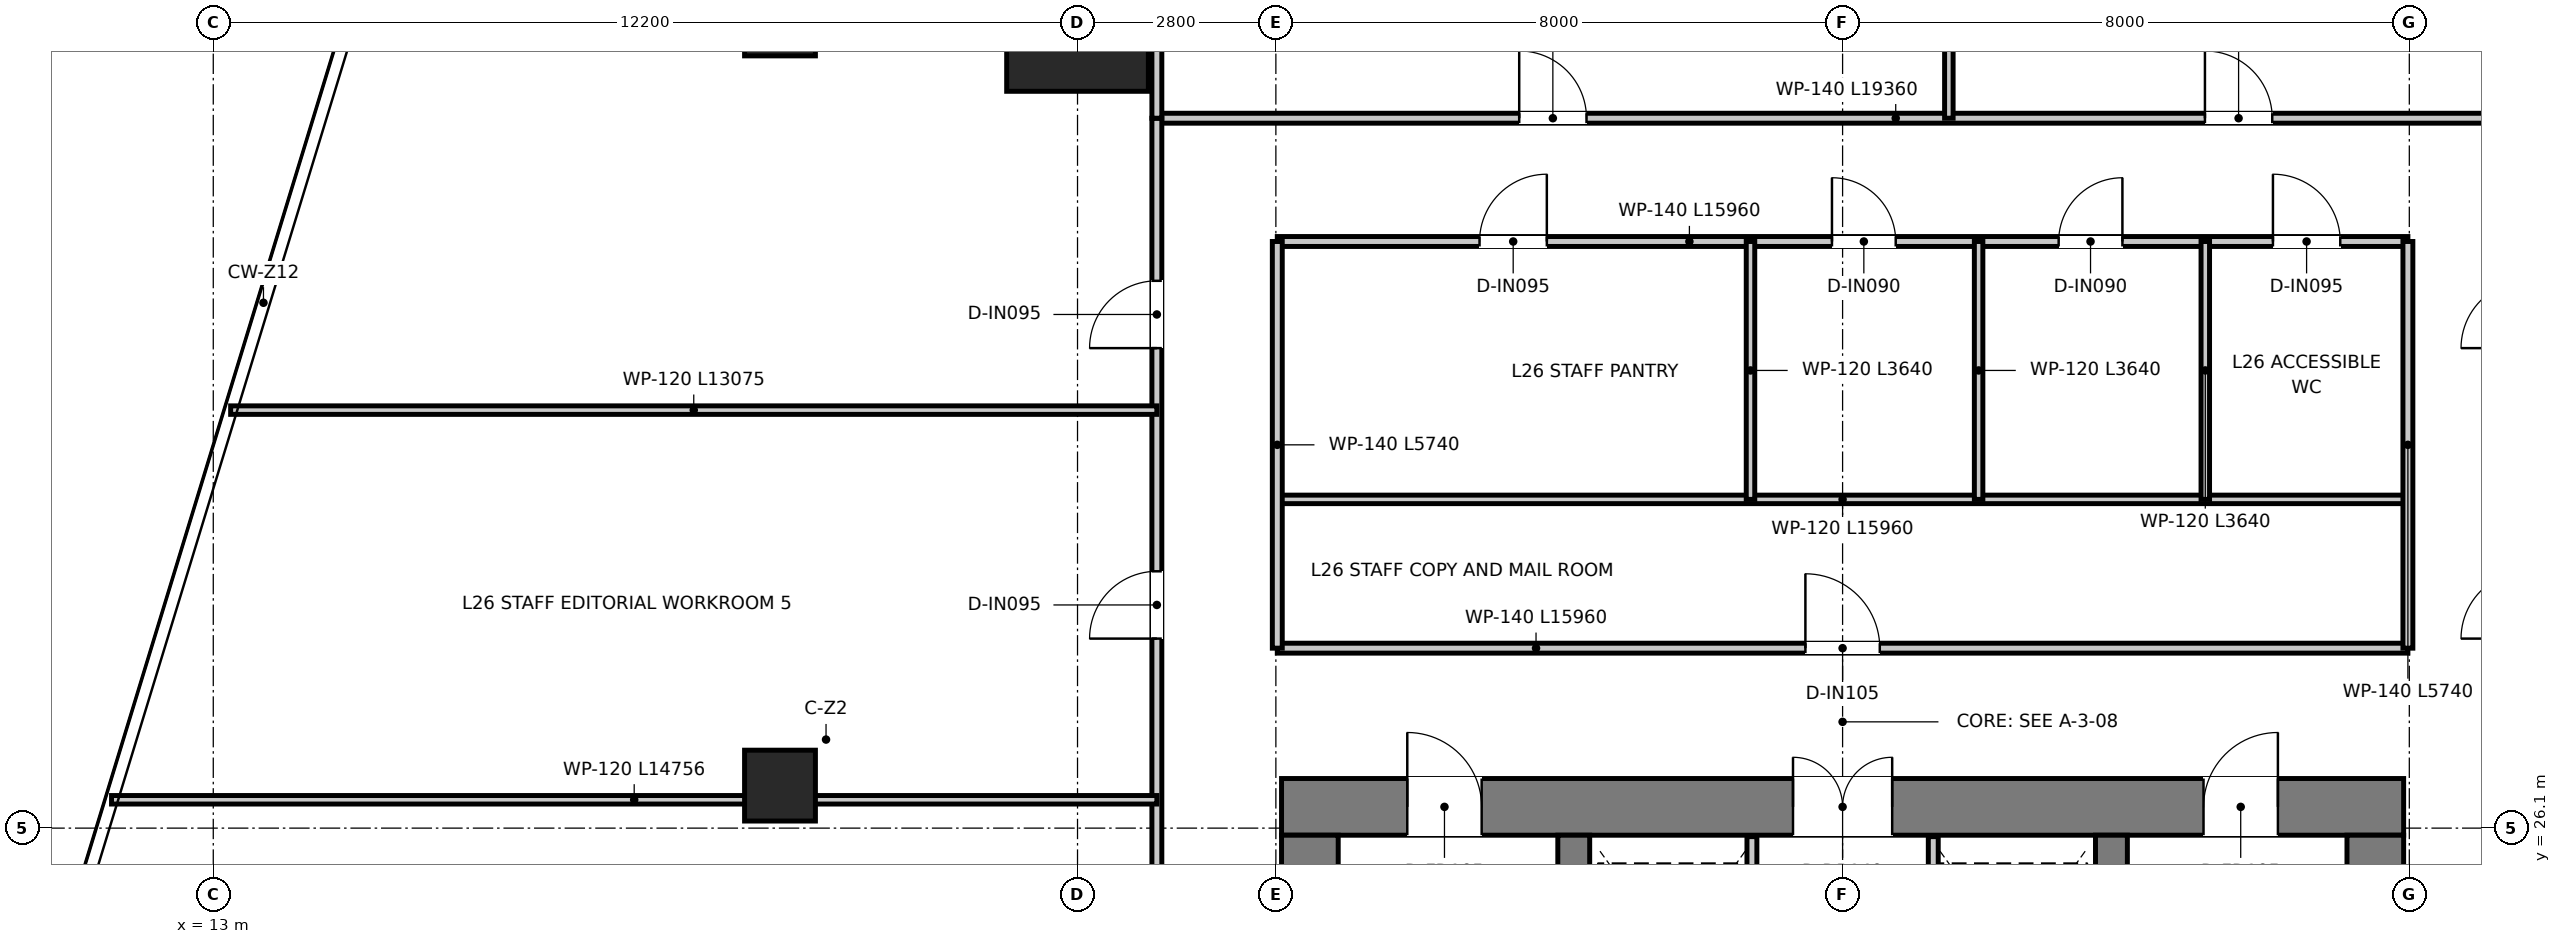
"""IFC4 building model, lengths in metres.
Left out: names, types, materials, properties, quantities, classifications, styles, units other than length and angle.
Written with IfcOpenShell. Run it as: python <this file> out.ifc"""

import sys

from ifc_helpers import new_model, si_unit, direction, frame, frame_2d, origin, origin_2d, place, context, subcontext, project, spatial, rectangle, extrude, source, transform, mapped, element, fill, save


model = new_model("IFC4")
c1 = context("Model", 3, precision=1e-05, world=origin(), true_north=direction((0.0, 1.0)))
c2 = subcontext(c1, "Body", "Model", "MODEL_VIEW")
j1 = project(units=[si_unit("LENGTHUNIT", "METRE"), si_unit("PLANEANGLEUNIT", "RADIAN")], contexts=[c1])
p1 = place(None, origin())
s1 = spatial("IfcSite", under=j1, at=p1, CompositionType="ELEMENT")
p2 = place(p1, origin())
s2 = spatial("IfcBuilding", under=s1, at=p2, CompositionType="ELEMENT")
p3 = place(p2, frame((0.0, 0.0, 109.8)))
s3 = spatial("IfcBuildingStorey", under=s2, at=p3, CompositionType="ELEMENT", Elevation=109.8)
p4 = place(p3, frame((28.08, 26.4, 0.0), z_axis=(0.0, 0.0, 1.0), x_axis=(1.0, 0.0, 0.0)))
e1 = element("IfcWall", 1, at=p4, inside=s3, PredefinedType="SHEAR", context=c2, shape_type="SweptSolid", body=[
    extrude(rectangle(XDim=15.84, YDim=0.8, at=frame_2d((7.92, 0.0))), origin(), (0.0, 0.0, 1.0), 3.95),
])
p5 = place(p4, frame((7.22, 0.0, 0.0)))
e2 = element("IfcOpeningElement", 2, at=p5, cuts=e1, PredefinedType="OPENING", context=c2, shape_type="SweptSolid", body=[
    extrude(rectangle(XDim=1.4, YDim=2.2, at=frame_2d((0.7, 1.1))), frame((0.0, 0.41, 0.0), z_axis=(0.0, -1.0, 0.0), x_axis=(1.0, 0.0, 0.0)), (0.0, 0.0, 1.0), 0.82),
])
p6 = place(p4, frame((1.775, 0.0, 0.0)))
e3 = element("IfcOpeningElement", 3, at=p6, cuts=e1, PredefinedType="OPENING", context=c2, shape_type="SweptSolid", body=[
    extrude(rectangle(XDim=1.05, YDim=2.1, at=frame_2d((0.525, 1.05))), frame((0.0, 0.41, 0.0), z_axis=(0.0, -1.0, 0.0), x_axis=(1.0, 0.0, 0.0)), (0.0, 0.0, 1.0), 0.82),
])
p7 = place(p4, frame((13.015, 0.0, 0.0)))
e4 = element("IfcOpeningElement", 4, at=p7, cuts=e1, PredefinedType="OPENING", context=c2, shape_type="SweptSolid", body=[
    extrude(rectangle(XDim=1.05, YDim=2.1, at=frame_2d((0.525, 1.05))), frame((0.0, 0.41, 0.0), z_axis=(0.0, -1.0, 0.0), x_axis=(1.0, 0.0, 0.0)), (0.0, 0.0, 1.0), 0.82),
])
for number, where, z_axis, x_axis in (
    (5, (28.48, 11.3, 0.0), (0.0, 0.0, 1.0), (0.0, 1.0, 0.0)),
    (6, (43.52, 11.3, 0.0), (0.0, 0.0, 1.0), (0.0, 1.0, 0.0)),
):
    element("IfcWall", number, at=place(p3, frame(where, z_axis=z_axis, x_axis=x_axis)), inside=s3, PredefinedType="SHEAR", context=c2, shape_type="SweptSolid", body=[
        extrude(rectangle(XDim=14.7, YDim=0.8, at=frame_2d((7.35, 0.0))), origin(), (0.0, 0.0, 1.0), 3.95),
    ])
p8 = place(p3, frame((32.205, 13.22, 0.0), z_axis=(0.0, 0.0, 1.0), x_axis=(0.0, 1.0, 0.0)))
e7 = element("IfcWall", 7, at=p8, inside=s3, PredefinedType="SHEAR", context=c2, shape_type="SweptSolid", body=[
    extrude(rectangle(XDim=12.78, YDim=0.45, at=frame_2d((6.39, 0.0))), origin(), (0.0, 0.0, 1.0), 3.95),
])
p9 = place(p8, frame((10.58, 0.0, 0.0)))
e8 = element("IfcOpeningElement", 8, at=p9, cuts=e7, PredefinedType="OPENING", context=c2, shape_type="SweptSolid", body=[
    extrude(rectangle(XDim=1.1, YDim=2.15, at=frame_2d((0.55, 1.075))), frame((0.0, 0.235, 0.0), z_axis=(0.0, -1.0, 0.0), x_axis=(1.0, 0.0, 0.0)), (0.0, 0.0, 1.0), 0.47),
])
p10 = place(p3, frame((39.795, 13.22, 0.0), z_axis=(0.0, 0.0, 1.0), x_axis=(0.0, 1.0, 0.0)))
e9 = element("IfcWall", 9, at=p10, inside=s3, PredefinedType="SHEAR", context=c2, shape_type="SweptSolid", body=[
    extrude(rectangle(XDim=12.78, YDim=0.45, at=frame_2d((6.39, 0.0))), origin(), (0.0, 0.0, 1.0), 3.95),
])
p11 = place(p10, frame((10.58, 0.0, 0.0)))
e10 = element("IfcOpeningElement", 10, at=p11, cuts=e9, PredefinedType="OPENING", context=c2, shape_type="SweptSolid", body=[
    extrude(rectangle(XDim=1.1, YDim=2.15, at=frame_2d((0.55, 1.075))), frame((0.0, 0.235, 0.0), z_axis=(0.0, -1.0, 0.0), x_axis=(1.0, 0.0, 0.0)), (0.0, 0.0, 1.0), 0.47),
])
m1 = source(origin(), c2, "Body", "SweptSolid", [
    extrude(rectangle(XDim=2.0, YDim=2.0, at=origin_2d()), origin(), (0.0, 0.0, 1.0), 3.95),
])
p12 = place(p3, frame((25.2, 37.5, 0.0), z_axis=(0.0, 0.0, 1.0), x_axis=(1.0, 0.0, 0.0)))
e11 = element("IfcColumn", 11, at=p12, inside=s3, PredefinedType="USERDEFINED", context=c2, shape_type="MappedRepresentation", body=[
    mapped(m1, transform((0.0, 0.0, 0.0), x_axis=(1.0, 0.0, 0.0), y_axis=(0.0, 1.0, 0.0), z_axis=(0.0, 0.0, 1.0), scale=1.0)),
])
m2 = source(origin(), c2, "Body", "SweptSolid", [
    extrude(rectangle(XDim=1.0, YDim=1.0, at=origin_2d()), origin(), (0.0, 0.0, 1.0), 3.95),
])
for number, where, z_axis, x_axis in (
    (12, (21.0, 26.7, 0.0), (0.0, 0.0, 1.0), (1.0, 0.0, 0.0)),
    (13, (21.0, 37.5, 0.0), (0.0, 0.0, 1.0), (1.0, 0.0, 0.0)),
):
    element("IfcColumn", number, at=place(p3, frame(where, z_axis=z_axis, x_axis=x_axis)), inside=s3, PredefinedType="COLUMN", context=c2, shape_type="MappedRepresentation", body=[
        mapped(m2, transform((0.0, 0.0, 0.0), x_axis=(1.0, 0.0, 0.0), y_axis=(0.0, 1.0, 0.0), z_axis=(0.0, 0.0, 1.0), scale=1.0)),
    ])
p13 = place(p3, frame((34.72, 20.2, 0.0), z_axis=(0.0, 0.0, 1.0), x_axis=(0.0, 1.0, 0.0)))
e14 = element("IfcWall", 14, at=p13, inside=s3, PredefinedType="PARTITIONING", context=c2, shape_type="SweptSolid", body=[
    extrude(rectangle(XDim=5.78, YDim=0.14, at=frame_2d((2.89, 0.0))), origin(), (0.0, 0.0, 1.0), 2.67),
])
p14 = place(p13, frame((1.05, 0.0, 0.0)))
e15 = element("IfcOpeningElement", 15, at=p14, cuts=e14, PredefinedType="OPENING", context=c2, shape_type="SweptSolid", body=[
    extrude(rectangle(XDim=0.9, YDim=2.1, at=frame_2d((0.45, 1.05))), frame((0.0, 0.08, 0.0), z_axis=(0.0, -1.0, 0.0), x_axis=(1.0, 0.0, 0.0)), (0.0, 0.0, 1.0), 0.16),
])
p15 = place(p3, frame((37.28, 20.2, 0.0), z_axis=(0.0, 0.0, 1.0), x_axis=(0.0, 1.0, 0.0)))
e16 = element("IfcWall", 16, at=p15, inside=s3, PredefinedType="PARTITIONING", context=c2, shape_type="SweptSolid", body=[
    extrude(rectangle(XDim=5.78, YDim=0.14, at=frame_2d((2.89, 0.0))), origin(), (0.0, 0.0, 1.0), 2.67),
])
p16 = place(p15, frame((0.95, 0.0, 0.0)))
e17 = element("IfcOpeningElement", 17, at=p16, cuts=e16, PredefinedType="OPENING", context=c2, shape_type="SweptSolid", body=[
    extrude(rectangle(XDim=1.1, YDim=2.15, at=frame_2d((0.55, 1.075))), frame((0.0, 0.08, 0.0), z_axis=(0.0, -1.0, 0.0), x_axis=(1.0, 0.0, 0.0)), (0.0, 0.0, 1.0), 0.16),
])
p17 = place(p3, frame((28.02, 28.64, 0.0), z_axis=(0.0, 0.0, 1.0), x_axis=(1.0, 0.0, 0.0)))
e18 = element("IfcWall", 18, at=p17, inside=s3, PredefinedType="PARTITIONING", context=c2, shape_type="SweptSolid", body=[
    extrude(rectangle(XDim=15.96, YDim=0.14, at=frame_2d((7.98, 0.0))), origin(), (0.0, 0.0, 1.0), 3.08),
])
p18 = place(p17, frame((7.455, 0.0, 0.0)))
e19 = element("IfcOpeningElement", 19, at=p18, cuts=e18, PredefinedType="OPENING", context=c2, shape_type="SweptSolid", body=[
    extrude(rectangle(XDim=1.05, YDim=2.15, at=frame_2d((0.525, 1.075))), frame((0.0, 0.08, 0.0), z_axis=(0.0, -1.0, 0.0), x_axis=(1.0, 0.0, 0.0)), (0.0, 0.0, 1.0), 0.16),
])
p19 = place(p3, frame((28.02, 30.74, 0.0), z_axis=(0.0, 0.0, 1.0), x_axis=(1.0, 0.0, 0.0)))
e20 = element("IfcWall", 20, at=p19, inside=s3, PredefinedType="PARTITIONING", context=c2, shape_type="SweptSolid", body=[
    extrude(rectangle(XDim=15.96, YDim=0.12, at=frame_2d((7.98, 0.0))), origin(), (0.0, 0.0, 1.0), 3.08),
])
p20 = place(p3, frame((28.02, 34.38, 0.0), z_axis=(0.0, 0.0, 1.0), x_axis=(1.0, 0.0, 0.0)))
e21 = element("IfcWall", 21, at=p20, inside=s3, PredefinedType="PARTITIONING", context=c2, shape_type="SweptSolid", body=[
    extrude(rectangle(XDim=15.96, YDim=0.14, at=frame_2d((7.98, 0.0))), origin(), (0.0, 0.0, 1.0), 3.08),
])
p21 = place(p20, frame((7.83, 0.0, 0.0)))
e22 = element("IfcOpeningElement", 22, at=p21, cuts=e21, PredefinedType="OPENING", context=c2, shape_type="SweptSolid", body=[
    extrude(rectangle(XDim=0.9, YDim=2.1, at=frame_2d((0.45, 1.05))), frame((0.0, 0.08, 0.0), z_axis=(0.0, -1.0, 0.0), x_axis=(1.0, 0.0, 0.0)), (0.0, 0.0, 1.0), 0.16),
])
p22 = place(p20, frame((11.03, 0.0, 0.0)))
e23 = element("IfcOpeningElement", 23, at=p22, cuts=e21, PredefinedType="OPENING", context=c2, shape_type="SweptSolid", body=[
    extrude(rectangle(XDim=0.9, YDim=2.1, at=frame_2d((0.45, 1.05))), frame((0.0, 0.08, 0.0), z_axis=(0.0, -1.0, 0.0), x_axis=(1.0, 0.0, 0.0)), (0.0, 0.0, 1.0), 0.16),
])
p23 = place(p20, frame((14.055, 0.0, 0.0)))
e24 = element("IfcOpeningElement", 24, at=p23, cuts=e21, PredefinedType="OPENING", context=c2, shape_type="SweptSolid", body=[
    extrude(rectangle(XDim=0.95, YDim=2.1, at=frame_2d((0.475, 1.05))), frame((0.0, 0.08, 0.0), z_axis=(0.0, -1.0, 0.0), x_axis=(1.0, 0.0, 0.0)), (0.0, 0.0, 1.0), 0.16),
])
p24 = place(p20, frame((2.855, 0.0, 0.0)))
e25 = element("IfcOpeningElement", 25, at=p24, cuts=e21, PredefinedType="OPENING", context=c2, shape_type="SweptSolid", body=[
    extrude(rectangle(XDim=0.95, YDim=2.1, at=frame_2d((0.475, 1.05))), frame((0.0, 0.08, 0.0), z_axis=(0.0, -1.0, 0.0), x_axis=(1.0, 0.0, 0.0)), (0.0, 0.0, 1.0), 0.16),
])
for number, where, z_axis, x_axis in (
    (26, (28.02, 28.64, 0.0), (0.0, 0.0, 1.0), (0.0, 1.0, 0.0)),
    (27, (43.98, 28.64, 0.0), (0.0, 0.0, 1.0), (0.0, 1.0, 0.0)),
):
    element("IfcWall", number, at=place(p3, frame(where, z_axis=z_axis, x_axis=x_axis)), inside=s3, PredefinedType="PARTITIONING", context=c2, shape_type="SweptSolid", body=[
        extrude(rectangle(XDim=5.74, YDim=0.14, at=frame_2d((2.87, 0.0))), origin(), (0.0, 0.0, 1.0), 3.27),
    ])
for number, where, z_axis, x_axis in (
    (28, (37.92, 30.74, 0.0), (0.0, 0.0, 1.0), (0.0, 1.0, 0.0)),
    (29, (41.12, 30.74, 0.0), (0.0, 0.0, 1.0), (0.0, 1.0, 0.0)),
    (30, (34.7, 30.74, 0.0), (0.0, 0.0, 1.0), (0.0, 1.0, 0.0)),
):
    element("IfcWall", number, at=place(p3, frame(where, z_axis=z_axis, x_axis=x_axis)), inside=s3, PredefinedType="PARTITIONING", context=c2, shape_type="SweptSolid", body=[
        extrude(rectangle(XDim=3.64, YDim=0.12, at=frame_2d((1.82, 0.0))), origin(), (0.0, 0.0, 1.0), 3.17),
    ])
p25 = place(p3, frame((26.32, 36.12, 0.0), z_axis=(0.0, 0.0, 1.0), x_axis=(1.0, 0.0, 0.0)))
e31 = element("IfcWall", 31, at=p25, inside=s3, PredefinedType="PARTITIONING", context=c2, shape_type="SweptSolid", body=[
    extrude(rectangle(XDim=19.36, YDim=0.14, at=frame_2d((9.68, 0.0))), origin(), (0.0, 0.0, 1.0), 3.08),
])
p26 = place(p25, frame((5.115, 0.0, 0.0)))
e32 = element("IfcOpeningElement", 32, at=p26, cuts=e31, PredefinedType="OPENING", context=c2, shape_type="SweptSolid", body=[
    extrude(rectangle(XDim=0.95, YDim=2.1, at=frame_2d((0.475, 1.05))), frame((0.0, 0.08, 0.0), z_axis=(0.0, -1.0, 0.0), x_axis=(1.0, 0.0, 0.0)), (0.0, 0.0, 1.0), 0.16),
])
p27 = place(p25, frame((14.795, 0.0, 0.0)))
e33 = element("IfcOpeningElement", 33, at=p27, cuts=e31, PredefinedType="OPENING", context=c2, shape_type="SweptSolid", body=[
    extrude(rectangle(XDim=0.95, YDim=2.1, at=frame_2d((0.475, 1.05))), frame((0.0, 0.08, 0.0), z_axis=(0.0, -1.0, 0.0), x_axis=(1.0, 0.0, 0.0)), (0.0, 0.0, 1.0), 0.16),
])
p28 = place(p3, frame((26.32, 10.5, 0.0), z_axis=(0.0, 0.0, 1.0), x_axis=(0.0, 1.0, 0.0)))
e34 = element("IfcWall", 34, at=p28, inside=s3, PredefinedType="PARTITIONING", context=c2, shape_type="SweptSolid", body=[
    extrude(rectangle(XDim=25.62, YDim=0.14, at=frame_2d((12.81, 0.0))), origin(), (0.0, 0.0, 1.0), 2.97),
])
p29 = place(p28, frame((8.275, 0.0, 0.0)))
e35 = element("IfcOpeningElement", 35, at=p29, cuts=e34, PredefinedType="OPENING", context=c2, shape_type="SweptSolid", body=[
    extrude(rectangle(XDim=0.95, YDim=2.1, at=frame_2d((0.475, 1.05))), frame((0.0, 0.08, 0.0), z_axis=(0.0, -1.0, 0.0), x_axis=(1.0, 0.0, 0.0)), (0.0, 0.0, 1.0), 0.16),
])
p30 = place(p28, frame((12.775, 0.0, 0.0)))
e36 = element("IfcOpeningElement", 36, at=p30, cuts=e34, PredefinedType="OPENING", context=c2, shape_type="SweptSolid", body=[
    extrude(rectangle(XDim=0.95, YDim=2.1, at=frame_2d((0.475, 1.05))), frame((0.0, 0.08, 0.0), z_axis=(0.0, -1.0, 0.0), x_axis=(1.0, 0.0, 0.0)), (0.0, 0.0, 1.0), 0.16),
])
p31 = place(p28, frame((18.275, 0.0, 0.0)))
e37 = element("IfcOpeningElement", 37, at=p31, cuts=e34, PredefinedType="OPENING", context=c2, shape_type="SweptSolid", body=[
    extrude(rectangle(XDim=0.95, YDim=2.1, at=frame_2d((0.475, 1.05))), frame((0.0, 0.08, 0.0), z_axis=(0.0, -1.0, 0.0), x_axis=(1.0, 0.0, 0.0)), (0.0, 0.0, 1.0), 0.16),
])
p32 = place(p28, frame((22.375, 0.0, 0.0)))
e38 = element("IfcOpeningElement", 38, at=p32, cuts=e34, PredefinedType="OPENING", context=c2, shape_type="SweptSolid", body=[
    extrude(rectangle(XDim=0.95, YDim=2.1, at=frame_2d((0.475, 1.05))), frame((0.0, 0.08, 0.0), z_axis=(0.0, -1.0, 0.0), x_axis=(1.0, 0.0, 0.0)), (0.0, 0.0, 1.0), 0.16),
])
p33 = place(p3, frame((26.32, 36.12, 0.0), z_axis=(0.0, 0.0, 1.0), x_axis=(0.0, 1.0, 0.0)))
e39 = element("IfcWall", 39, at=p33, inside=s3, PredefinedType="PARTITIONING", context=c2, shape_type="SweptSolid", body=[
    extrude(rectangle(XDim=17.914, YDim=0.14, at=frame_2d((8.957, 0.0))), origin(), (0.0, 0.0, 1.0), 2.97),
])
p34 = place(p3, frame((37.5, 36.12, 0.0), z_axis=(0.0, 0.0, 1.0), x_axis=(0.0, 1.0, 0.0)))
e40 = element("IfcWall", 40, at=p34, inside=s3, PredefinedType="PARTITIONING", context=c2, shape_type="SweptSolid", body=[
    extrude(rectangle(XDim=14.496, YDim=0.12, at=frame_2d((7.248, 0.0))), origin(), (0.0, 0.0, 1.0), 2.97),
])
p35 = place(p3, frame((11.564, 26.5, 0.0), z_axis=(0.0, 0.0, 1.0), x_axis=(1.0, 0.0, 0.0)))
e41 = element("IfcWall", 41, at=p35, inside=s3, PredefinedType="PARTITIONING", context=c2, shape_type="SweptSolid", body=[
    extrude(rectangle(XDim=14.756, YDim=0.12, at=frame_2d((7.378, 0.0))), origin(), (0.0, 0.0, 1.0), 2.97),
])
p36 = place(p3, frame((13.245, 32.0, 0.0), z_axis=(0.0, 0.0, 1.0), x_axis=(1.0, 0.0, 0.0)))
e42 = element("IfcWall", 42, at=p36, inside=s3, PredefinedType="PARTITIONING", context=c2, shape_type="SweptSolid", body=[
    extrude(rectangle(XDim=13.075, YDim=0.12, at=frame_2d((6.537, 0.0))), origin(), (0.0, 0.0, 1.0), 2.97),
])
p37 = place(p5, origin())
e43 = element("IfcDoor", 43, at=p37, inside=s3, OperationType="DOUBLE_DOOR_SINGLE_SWING", PredefinedType="DOOR", context=c2, shape_type="SweptSolid", body=[
    extrude(rectangle(XDim=1.4, YDim=2.2, at=frame_2d((0.7, 1.1))), frame((0.0, 0.025, 0.0), z_axis=(0.0, -1.0, 0.0), x_axis=(1.0, 0.0, 0.0)), (0.0, 0.0, 1.0), 0.05),
])
fill(e2, e43)
p38 = place(p6, origin())
e44 = element("IfcDoor", 44, at=p38, inside=s3, OperationType="SINGLE_SWING_LEFT", PredefinedType="DOOR", context=c2, shape_type="SweptSolid", body=[
    extrude(rectangle(XDim=1.05, YDim=2.1, at=frame_2d((0.525, 1.05))), frame((0.0, 0.025, 0.0), z_axis=(0.0, -1.0, 0.0), x_axis=(1.0, 0.0, 0.0)), (0.0, 0.0, 1.0), 0.05),
])
fill(e3, e44)
p39 = place(p7, origin())
e45 = element("IfcDoor", 45, at=p39, inside=s3, OperationType="SINGLE_SWING_RIGHT", PredefinedType="DOOR", context=c2, shape_type="SweptSolid", body=[
    extrude(rectangle(XDim=1.05, YDim=2.1, at=frame_2d((0.525, 1.05))), frame((0.0, 0.025, 0.0), z_axis=(0.0, -1.0, 0.0), x_axis=(1.0, 0.0, 0.0)), (0.0, 0.0, 1.0), 0.05),
])
fill(e4, e45)
p40 = place(p18, origin())
e46 = element("IfcDoor", 46, at=p40, inside=s3, OperationType="SINGLE_SWING_LEFT", PredefinedType="DOOR", context=c2, shape_type="SweptSolid", body=[
    extrude(rectangle(XDim=1.05, YDim=2.15, at=frame_2d((0.525, 1.075))), frame((0.0, 0.025, 0.0), z_axis=(0.0, -1.0, 0.0), x_axis=(1.0, 0.0, 0.0)), (0.0, 0.0, 1.0), 0.05),
])
fill(e19, e46)
p41 = place(p21, origin())
e47 = element("IfcDoor", 47, at=p41, inside=s3, OperationType="SINGLE_SWING_LEFT", PredefinedType="DOOR", context=c2, shape_type="SweptSolid", body=[
    extrude(rectangle(XDim=0.9, YDim=2.1, at=frame_2d((0.45, 1.05))), frame((0.0, 0.025, 0.0), z_axis=(0.0, -1.0, 0.0), x_axis=(1.0, 0.0, 0.0)), (0.0, 0.0, 1.0), 0.05),
])
fill(e22, e47)
p42 = place(p22, origin())
e48 = element("IfcDoor", 48, at=p42, inside=s3, OperationType="SINGLE_SWING_RIGHT", PredefinedType="DOOR", context=c2, shape_type="SweptSolid", body=[
    extrude(rectangle(XDim=0.9, YDim=2.1, at=frame_2d((0.45, 1.05))), frame((0.0, 0.025, 0.0), z_axis=(0.0, -1.0, 0.0), x_axis=(1.0, 0.0, 0.0)), (0.0, 0.0, 1.0), 0.05),
])
fill(e23, e48)
p43 = place(p23, origin())
e49 = element("IfcDoor", 49, at=p43, inside=s3, OperationType="SINGLE_SWING_LEFT", PredefinedType="DOOR", context=c2, shape_type="SweptSolid", body=[
    extrude(rectangle(XDim=0.95, YDim=2.1, at=frame_2d((0.475, 1.05))), frame((0.0, 0.025, 0.0), z_axis=(0.0, -1.0, 0.0), x_axis=(1.0, 0.0, 0.0)), (0.0, 0.0, 1.0), 0.05),
])
fill(e24, e49)
p44 = place(p24, origin())
e50 = element("IfcDoor", 50, at=p44, inside=s3, OperationType="SINGLE_SWING_RIGHT", PredefinedType="DOOR", context=c2, shape_type="SweptSolid", body=[
    extrude(rectangle(XDim=0.95, YDim=2.1, at=frame_2d((0.475, 1.05))), frame((0.0, 0.025, 0.0), z_axis=(0.0, -1.0, 0.0), x_axis=(1.0, 0.0, 0.0)), (0.0, 0.0, 1.0), 0.05),
])
fill(e25, e50)
p45 = place(p26, origin())
e51 = element("IfcDoor", 51, at=p45, inside=s3, OperationType="SINGLE_SWING_LEFT", PredefinedType="DOOR", context=c2, shape_type="SweptSolid", body=[
    extrude(rectangle(XDim=0.95, YDim=2.1, at=frame_2d((0.475, 1.05))), frame((0.0, 0.025, 0.0), z_axis=(0.0, -1.0, 0.0), x_axis=(1.0, 0.0, 0.0)), (0.0, 0.0, 1.0), 0.05),
])
fill(e32, e51)
p46 = place(p27, origin())
e52 = element("IfcDoor", 52, at=p46, inside=s3, OperationType="SINGLE_SWING_LEFT", PredefinedType="DOOR", context=c2, shape_type="SweptSolid", body=[
    extrude(rectangle(XDim=0.95, YDim=2.1, at=frame_2d((0.475, 1.05))), frame((0.0, 0.025, 0.0), z_axis=(0.0, -1.0, 0.0), x_axis=(1.0, 0.0, 0.0)), (0.0, 0.0, 1.0), 0.05),
])
fill(e33, e52)
p47 = place(p31, origin())
e53 = element("IfcDoor", 53, at=p47, inside=s3, OperationType="SINGLE_SWING_LEFT", PredefinedType="DOOR", context=c2, shape_type="SweptSolid", body=[
    extrude(rectangle(XDim=0.95, YDim=2.1, at=frame_2d((0.475, 1.05))), frame((0.0, 0.025, 0.0), z_axis=(0.0, -1.0, 0.0), x_axis=(1.0, 0.0, 0.0)), (0.0, 0.0, 1.0), 0.05),
])
fill(e37, e53)
p48 = place(p32, origin())
e54 = element("IfcDoor", 54, at=p48, inside=s3, OperationType="SINGLE_SWING_LEFT", PredefinedType="DOOR", context=c2, shape_type="SweptSolid", body=[
    extrude(rectangle(XDim=0.95, YDim=2.1, at=frame_2d((0.475, 1.05))), frame((0.0, 0.025, 0.0), z_axis=(0.0, -1.0, 0.0), x_axis=(1.0, 0.0, 0.0)), (0.0, 0.0, 1.0), 0.05),
])
fill(e38, e54)
save(model, sys.argv[1])
